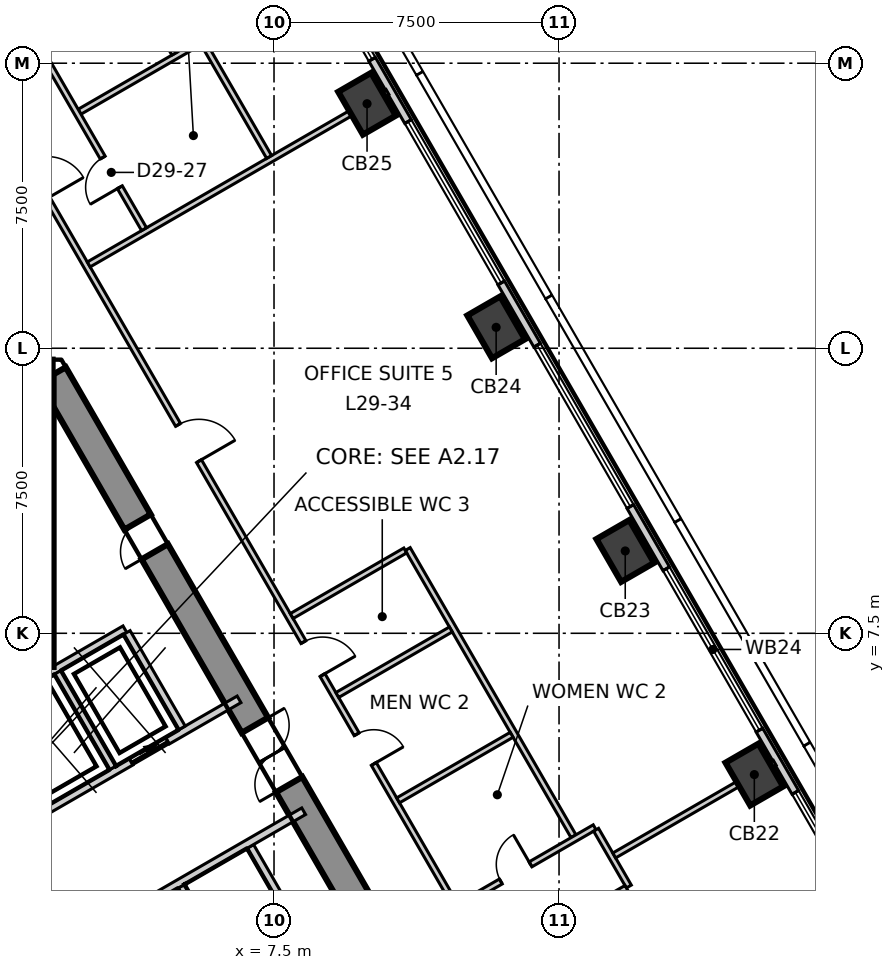
"""IFC4 building model, lengths in metres.
Left out: names, types, materials, properties, quantities, classifications, styles, units other than length and angle.
Written with IfcOpenShell. Run it as: python <this file> out.ifc"""

import sys

from ifc_helpers import new_model, si_unit, direction, frame, frame_2d, origin, origin_2d, place, context, subcontext, project, spatial, polyline, rectangle, outline, extrude, element, fill, save


model = new_model("IFC4")
c1 = context("Model", 3, precision=1e-05, world=origin(), true_north=direction((0.0, 1.0)))
c2 = subcontext(c1, "Body", "Model", "MODEL_VIEW")
j1 = project(units=[si_unit("LENGTHUNIT", "METRE"), si_unit("PLANEANGLEUNIT", "RADIAN")], contexts=[c1])
p1 = place(None, origin())
s1 = spatial("IfcSite", under=j1, at=p1, CompositionType="ELEMENT")
p2 = place(p1, origin())
s2 = spatial("IfcBuilding", under=s1, at=p2, CompositionType="ELEMENT")
p3 = place(p2, frame((0.0, 0.0, 128.3)))
s3 = spatial("IfcBuildingStorey", under=s2, at=p3, CompositionType="ELEMENT", Elevation=128.3)
p4 = place(p3, frame((1.674, 14.3, -0.3), z_axis=(0.0, 0.0, 1.0), x_axis=(-1.0, 0.0, 0.0)))
e1 = element("IfcWall", 1, at=p4, inside=s3, PredefinedType="SHEAR", context=c2, shape_type="SweptSolid", body=[
    extrude(outline(polyline([(-0.231, -0.4), (1.674, -0.4), (3.579, -0.4), (3.117, 0.4), (1.674, 0.4), (0.231, 0.4), (-0.231, -0.4)])), origin(), (0.0, 0.0, 1.0), 4.0),
])
p5 = place(p4, frame((0.974, 0.0, 0.3)))
e2 = element("IfcOpeningElement", 2, at=p5, cuts=e1, PredefinedType="OPENING", context=c2, shape_type="SweptSolid", body=[
    extrude(rectangle(XDim=1.4, YDim=2.1, at=frame_2d((0.7, 1.05))), frame((0.0, 0.41, 0.0), z_axis=(0.0, -1.0, 0.0), x_axis=(1.0, 0.0, 0.0)), (0.0, 0.0, 1.0), 0.82),
])
p6 = place(p3, frame((13.221, -5.7, -0.3), z_axis=(0.0, 0.0, 1.0), x_axis=(-0.499995765644, 0.866027848477, 0.0)))
e3 = element("IfcWall", 3, at=p6, inside=s3, PredefinedType="SHEAR", context=c2, shape_type="SweptSolid", body=[
    extrude(outline(polyline([(-0.231, -0.4), (1.732, -0.4), (3.695, -0.4), (5.658, -0.4), (7.621, -0.4), (9.584, -0.4), (11.547, -0.4), (13.51, -0.4), (15.473, -0.4), (17.436, -0.4), (19.399, -0.4), (21.362, -0.4), (23.325, -0.4), (22.863, 0.4), (20.977, 0.4), (19.091, 0.4), (17.205, 0.4), (15.319, 0.4), (13.433, 0.4), (11.547, 0.4), (9.661, 0.4), (7.775, 0.4), (5.889, 0.4), (4.003, 0.4), (2.117, 0.4), (0.231, 0.4), (-0.231, -0.4)])), origin(), (0.0, 0.0, 1.0), 4.0),
])
p7 = place(p6, frame((10.647, 0.0, 0.3)))
e4 = element("IfcOpeningElement", 4, at=p7, cuts=e3, PredefinedType="OPENING", context=c2, shape_type="SweptSolid", body=[
    extrude(rectangle(XDim=1.8, YDim=2.1, at=frame_2d((0.9, 1.05))), frame((0.0, 0.41, 0.0), z_axis=(0.0, -1.0, 0.0), x_axis=(1.0, 0.0, 0.0)), (0.0, 0.0, 1.0), 0.82),
])
p8 = place(p6, frame((17.721, 0.0, 0.3)))
e5 = element("IfcOpeningElement", 5, at=p8, cuts=e3, PredefinedType="OPENING", context=c2, shape_type="SweptSolid", body=[
    extrude(rectangle(XDim=0.9, YDim=2.1, at=frame_2d((0.45, 1.05))), frame((0.0, 0.41, 0.0), z_axis=(0.0, -1.0, 0.0), x_axis=(1.0, 0.0, 0.0)), (0.0, 0.0, 1.0), 0.82),
])
for number, where, z_axis, x_axis in (
    (6, (20.139, 3.782, -0.3), (0.0, 0.0, 1.0), (-0.5, 0.866, 0.0)),
    (7, (16.742, 9.666, -0.3), (0.0, 0.0, 1.0), (-0.5, 0.866, 0.0)),
    (8, (13.345, 15.55, -0.3), (0.0, 0.0, 1.0), (-0.5, 0.866, 0.0)),
    (9, (9.948, 21.434, -0.3), (0.0, 0.0, 1.0), (-0.5, 0.866, 0.0)),
):
    element("IfcColumn", number, at=place(p3, frame(where, z_axis=z_axis, x_axis=x_axis)), inside=s3, PredefinedType="COLUMN", context=c2, shape_type="SweptSolid", body=[
        extrude(rectangle(XDim=1.3, YDim=1.0, at=origin_2d()), origin(), (0.0, 0.0, 1.0), 4.0),
    ])
p9 = place(p3, frame((31.588, -14.647, 0.0), z_axis=(0.0, 0.0, 1.0), x_axis=(-0.500005036527, 0.866022495925, 0.0)))
e10 = element("IfcWall", 10, at=p9, inside=s3, PredefinedType="ELEMENTEDWALL", context=c2, shape_type="SweptSolid", body=[
    extrude(rectangle(XDim=56.938, YDim=0.2, at=frame_2d((28.469, 0.0))), origin(), (0.0, 0.0, 1.0), 3.7),
])
p10 = place(p9, frame((2.25, 0.0, 0.9)))
e11 = element("IfcOpeningElement", 11, at=p10, cuts=e10, PredefinedType="OPENING", context=c2, shape_type="SweptSolid", body=[
    extrude(rectangle(XDim=4.9, YDim=2.5, at=frame_2d((2.45, 1.25))), frame((0.0, 0.11, 0.0), z_axis=(0.0, -1.0, 0.0), x_axis=(1.0, 0.0, 0.0)), (0.0, 0.0, 1.0), 0.22),
])
p11 = place(p9, frame((9.044, 0.0, 0.9)))
e12 = element("IfcOpeningElement", 12, at=p11, cuts=e10, PredefinedType="OPENING", context=c2, shape_type="SweptSolid", body=[
    extrude(rectangle(XDim=4.9, YDim=2.5, at=frame_2d((2.45, 1.25))), frame((0.0, 0.11, 0.0), z_axis=(0.0, -1.0, 0.0), x_axis=(1.0, 0.0, 0.0)), (0.0, 0.0, 1.0), 0.22),
])
p12 = place(p9, frame((15.838, 0.0, 0.9)))
e13 = element("IfcOpeningElement", 13, at=p12, cuts=e10, PredefinedType="OPENING", context=c2, shape_type="SweptSolid", body=[
    extrude(rectangle(XDim=4.9, YDim=2.5, at=frame_2d((2.45, 1.25))), frame((0.0, 0.11, 0.0), z_axis=(0.0, -1.0, 0.0), x_axis=(1.0, 0.0, 0.0)), (0.0, 0.0, 1.0), 0.22),
])
p13 = place(p9, frame((22.632, 0.0, 0.9)))
e14 = element("IfcOpeningElement", 14, at=p13, cuts=e10, PredefinedType="OPENING", context=c2, shape_type="SweptSolid", body=[
    extrude(rectangle(XDim=4.9, YDim=2.5, at=frame_2d((2.45, 1.25))), frame((0.0, 0.11, 0.0), z_axis=(0.0, -1.0, 0.0), x_axis=(1.0, 0.0, 0.0)), (0.0, 0.0, 1.0), 0.22),
])
p14 = place(p9, frame((29.426, 0.0, 0.9)))
e15 = element("IfcOpeningElement", 15, at=p14, cuts=e10, PredefinedType="OPENING", context=c2, shape_type="SweptSolid", body=[
    extrude(rectangle(XDim=4.9, YDim=2.5, at=frame_2d((2.45, 1.25))), frame((0.0, 0.11, 0.0), z_axis=(0.0, -1.0, 0.0), x_axis=(1.0, 0.0, 0.0)), (0.0, 0.0, 1.0), 0.22),
])
p15 = place(p9, frame((36.22, 0.0, 0.9)))
e16 = element("IfcOpeningElement", 16, at=p15, cuts=e10, PredefinedType="OPENING", context=c2, shape_type="SweptSolid", body=[
    extrude(rectangle(XDim=4.9, YDim=2.5, at=frame_2d((2.45, 1.25))), frame((0.0, 0.11, 0.0), z_axis=(0.0, -1.0, 0.0), x_axis=(1.0, 0.0, 0.0)), (0.0, 0.0, 1.0), 0.22),
])
p16 = place(p9, frame((43.014, 0.0, 0.9)))
e17 = element("IfcOpeningElement", 17, at=p16, cuts=e10, PredefinedType="OPENING", context=c2, shape_type="SweptSolid", body=[
    extrude(rectangle(XDim=4.9, YDim=2.5, at=frame_2d((2.45, 1.25))), frame((0.0, 0.11, 0.0), z_axis=(0.0, -1.0, 0.0), x_axis=(1.0, 0.0, 0.0)), (0.0, 0.0, 1.0), 0.22),
])
p17 = place(p9, frame((49.808, 0.0, 0.9)))
e18 = element("IfcOpeningElement", 18, at=p17, cuts=e10, PredefinedType="OPENING", context=c2, shape_type="SweptSolid", body=[
    extrude(rectangle(XDim=4.9, YDim=2.5, at=frame_2d((2.45, 1.25))), frame((0.0, 0.11, 0.0), z_axis=(0.0, -1.0, 0.0), x_axis=(1.0, 0.0, 0.0)), (0.0, 0.0, 1.0), 0.22),
])
p18 = place(p3, frame((0.076, 21.468, 0.0), z_axis=(0.0, 0.0, 1.0), x_axis=(0.50001203818, -0.866018453426, 0.0)))
e19 = element("IfcWall", 19, at=p18, inside=s3, PredefinedType="PARTITIONING", context=c2, shape_type="SweptSolid", body=[
    extrude(rectangle(XDim=24.448, YDim=0.15, at=frame_2d((12.224, 0.0))), origin(), (0.0, 0.0, 1.0), 3.7),
])
p19 = place(p18, frame((9.798, 0.0, 0.0)))
e20 = element("IfcOpeningElement", 20, at=p19, cuts=e19, PredefinedType="OPENING", context=c2, shape_type="SweptSolid", body=[
    extrude(rectangle(XDim=1.1, YDim=2.1, at=frame_2d((0.55, 1.05))), frame((0.0, 0.085, 0.0), z_axis=(0.0, -1.0, 0.0), x_axis=(1.0, 0.0, 0.0)), (0.0, 0.0, 1.0), 0.17),
])
p20 = place(p18, frame((19.198, 0.0, 0.0)))
e21 = element("IfcOpeningElement", 21, at=p20, cuts=e19, PredefinedType="OPENING", context=c2, shape_type="SweptSolid", body=[
    extrude(rectangle(XDim=0.9, YDim=2.1, at=frame_2d((0.45, 1.05))), frame((0.0, 0.085, 0.0), z_axis=(0.0, -1.0, 0.0), x_axis=(1.0, 0.0, 0.0)), (0.0, 0.0, 1.0), 0.17),
])
p21 = place(p18, frame((16.398, 0.0, 0.0)))
e22 = element("IfcOpeningElement", 22, at=p21, cuts=e19, PredefinedType="OPENING", context=c2, shape_type="SweptSolid", body=[
    extrude(rectangle(XDim=1.0, YDim=2.1, at=frame_2d((0.5, 1.05))), frame((0.0, 0.085, 0.0), z_axis=(0.0, -1.0, 0.0), x_axis=(1.0, 0.0, 0.0)), (0.0, 0.0, 1.0), 0.17),
])
p22 = place(p18, frame((1.815, 0.0, 0.0)))
e23 = element("IfcOpeningElement", 23, at=p22, cuts=e19, PredefinedType="OPENING", context=c2, shape_type="SweptSolid", body=[
    extrude(rectangle(XDim=1.1, YDim=2.1, at=frame_2d((0.55, 1.05))), frame((0.0, 0.085, 0.0), z_axis=(0.0, -1.0, 0.0), x_axis=(1.0, 0.0, 0.0)), (0.0, 0.0, 1.0), 0.17),
])
p23 = place(p3, frame((2.624, 17.205, 0.0), z_axis=(0.0, 0.0, 1.0), x_axis=(0.866014937375, 0.500018127915, 0.0)))
e24 = element("IfcWall", 24, at=p23, inside=s3, PredefinedType="PARTITIONING", context=c2, shape_type="SweptSolid", body=[
    extrude(rectangle(XDim=9.077, YDim=0.15, at=frame_2d((4.539, 0.0))), origin(), (0.0, 0.0, 1.0), 3.7),
])
p24 = place(p3, frame((11.018, 9.717, 0.0), z_axis=(0.0, 0.0, 1.0), x_axis=(0.499888770922, -0.866089612399, 0.0)))
e25 = element("IfcWall", 25, at=p24, inside=s3, PredefinedType="PARTITIONING", context=c2, shape_type="SweptSolid", body=[
    extrude(rectangle(XDim=8.726, YDim=0.15, at=frame_2d((4.363, 0.0))), origin(), (0.0, 0.0, 1.0), 3.7),
])
p25 = place(p3, frame((7.965, 7.954, 0.0), z_axis=(0.0, 0.0, 1.0), x_axis=(0.866044174857, 0.499967486139, 0.0)))
e26 = element("IfcWall", 26, at=p25, inside=s3, PredefinedType="PARTITIONING", context=c2, shape_type="SweptSolid", body=[
    extrude(rectangle(XDim=3.45, YDim=0.15, at=frame_2d((1.725, 0.0))), origin(), (0.0, 0.0, 1.0), 3.7),
])
for number, where, z_axis, x_axis in (
    (27, (9.165, 5.876, 0.0), (0.0, 0.0, 1.0), (0.866, 0.5, 0.0)),
    (28, (10.765, 3.104, 0.0), (0.0, 0.0, 1.0), (0.866, 0.5, 0.0)),
):
    element("IfcWall", number, at=place(p3, frame(where, z_axis=z_axis, x_axis=x_axis)), inside=s3, PredefinedType="PARTITIONING", context=c2, shape_type="SweptSolid", body=[
        extrude(rectangle(XDim=3.45, YDim=0.15, at=frame_2d((1.725, 0.0))), origin(), (0.0, 0.0, 1.0), 3.7),
    ])
p26 = place(p3, frame((12.366, 0.333, 0.0), z_axis=(0.0, 0.0, 1.0), x_axis=(0.865997263264, 0.500048737644, 0.0)))
e29 = element("IfcWall", 29, at=p26, inside=s3, PredefinedType="PARTITIONING", context=c2, shape_type="SweptSolid", body=[
    extrude(rectangle(XDim=4.124, YDim=0.15, at=frame_2d((2.062, 0.0))), origin(), (0.0, 0.0, 1.0), 3.7),
])
p27 = place(p26, frame((1.274, 0.0, 0.0)))
e30 = element("IfcOpeningElement", 30, at=p27, cuts=e29, PredefinedType="OPENING", context=c2, shape_type="SweptSolid", body=[
    extrude(rectangle(XDim=0.9, YDim=2.1, at=frame_2d((0.45, 1.05))), frame((0.0, 0.085, 0.0), z_axis=(0.0, -1.0, 0.0), x_axis=(1.0, 0.0, 0.0)), (0.0, 0.0, 1.0), 0.17),
])
p28 = place(p3, frame((15.975, 2.331, 0.0), z_axis=(0.0, 0.0, 1.0), x_axis=(0.499640762619, -0.866232710263, 0.0)))
e31 = element("IfcWall", 31, at=p28, inside=s3, PredefinedType="PARTITIONING", context=c2, shape_type="SweptSolid", body=[
    extrude(rectangle(XDim=1.725, YDim=0.15, at=frame_2d((0.862, 0.0))), origin(), (0.0, 0.0, 1.0), 3.7),
])
p29 = place(p3, frame((16.452, 1.654, 0.0), z_axis=(0.0, 0.0, 1.0), x_axis=(0.866097235509, 0.49987556316, 0.0)))
e32 = element("IfcWall", 32, at=p29, inside=s3, PredefinedType="PARTITIONING", context=c2, shape_type="SweptSolid", body=[
    extrude(rectangle(XDim=4.877, YDim=0.15, at=frame_2d((2.438, 0.0))), origin(), (0.0, 0.0, 1.0), 3.7),
])
p30 = place(p3, frame((13.266, -1.225, 0.0), z_axis=(0.0, 0.0, 1.0), x_axis=(0.866079163253, 0.499906874306, 0.0)))
e33 = element("IfcWall", 33, at=p30, inside=s3, PredefinedType="PARTITIONING", context=c2, shape_type="SweptSolid", body=[
    extrude(rectangle(XDim=4.049, YDim=0.15, at=frame_2d((2.024, 0.0))), origin(), (0.0, 0.0, 1.0), 3.7),
])
p31 = place(p3, frame((2.383, 21.223, 0.0), z_axis=(0.0, 0.0, 1.0), x_axis=(0.865955274182, 0.500121448367, 0.0)))
e34 = element("IfcWall", 34, at=p31, inside=s3, PredefinedType="PARTITIONING", context=c2, shape_type="SweptSolid", body=[
    extrude(rectangle(XDim=3.725, YDim=0.15, at=frame_2d((1.863, 0.0))), origin(), (0.0, 0.0, 1.0), 3.7),
])
p32 = place(p3, frame((5.646, 23.021, 0.0), z_axis=(0.0, 0.0, 1.0), x_axis=(0.49998991961, -0.866031223622, 0.0)))
e35 = element("IfcWall", 35, at=p32, inside=s3, PredefinedType="PARTITIONING", context=c2, shape_type="SweptSolid", body=[
    extrude(rectangle(XDim=3.45, YDim=0.15, at=frame_2d((1.725, 0.0))), origin(), (0.0, 0.0, 1.0), 3.7),
])
p33 = place(p3, frame((3.816, 24.591, 0.0), z_axis=(0.0, 0.0, 1.0), x_axis=(0.499871667208, -0.86609948408, 0.0)))
e36 = element("IfcWall", 36, at=p33, inside=s3, PredefinedType="PARTITIONING", context=c2, shape_type="SweptSolid", body=[
    extrude(rectangle(XDim=2.125, YDim=0.15, at=frame_2d((1.062, 0.0))), origin(), (0.0, 0.0, 1.0), 3.7),
])
p34 = place(p3, frame((1.255, 23.026, 0.0), z_axis=(0.0, 0.0, 1.0), x_axis=(0.500042884217, -0.866000643155, 0.0)))
e37 = element("IfcWall", 37, at=p34, inside=s3, PredefinedType="PARTITIONING", context=c2, shape_type="SweptSolid", body=[
    extrude(rectangle(XDim=5.65, YDim=0.15, at=frame_2d((2.825, 0.0))), origin(), (0.0, 0.0, 1.0), 3.7),
])
p35 = place(p34, frame((3.475, 0.0, 0.0)))
e38 = element("IfcOpeningElement", 38, at=p35, cuts=e37, PredefinedType="OPENING", context=c2, shape_type="SweptSolid", body=[
    extrude(rectangle(XDim=0.9, YDim=2.1, at=frame_2d((0.45, 1.05))), frame((0.0, 0.085, 0.0), z_axis=(0.0, -1.0, 0.0), x_axis=(1.0, 0.0, 0.0)), (0.0, 0.0, 1.0), 0.17),
])
p36 = place(p3, frame((-0.002, 5.542, 0.0), z_axis=(0.0, 0.0, 1.0), x_axis=(0.866103910842, 0.499863997127, 0.0)))
e39 = element("IfcWall", 39, at=p36, inside=s3, PredefinedType="SOLIDWALL", context=c2, shape_type="SweptSolid", body=[
    extrude(rectangle(XDim=4.131, YDim=0.2, at=frame_2d((2.065, 0.0))), origin(), (0.0, 0.0, 1.0), 3.7),
])
p37 = place(p3, frame((1.577, 2.874, 0.0), z_axis=(0.0, 0.0, 1.0), x_axis=(0.866073694534, 0.499916348638, 0.0)))
e40 = element("IfcWall", 40, at=p37, inside=s3, PredefinedType="SOLIDWALL", context=c2, shape_type="SweptSolid", body=[
    extrude(rectangle(XDim=5.777, YDim=0.2, at=frame_2d((2.888, 0.0))), origin(), (0.0, 0.0, 1.0), 3.7),
])
p38 = place(p37, frame((2.497, 0.0, 0.0)))
e41 = element("IfcOpeningElement", 41, at=p38, cuts=e40, PredefinedType="OPENING", context=c2, shape_type="SweptSolid", body=[
    extrude(rectangle(XDim=1.1, YDim=2.1, at=frame_2d((0.55, 1.05))), frame((0.0, 0.11, 0.0), z_axis=(0.0, -1.0, 0.0), x_axis=(1.0, 0.0, 0.0)), (0.0, 0.0, 1.0), 0.22),
])
p39 = place(p3, frame((3.626, 7.52, 0.0), z_axis=(0.0, 0.0, 1.0), x_axis=(0.500060147554, -0.865990674793, 0.0)))
e42 = element("IfcWall", 42, at=p39, inside=s3, PredefinedType="SOLIDWALL", context=c2, shape_type="SweptSolid", body=[
    extrude(rectangle(XDim=2.9, YDim=0.2, at=frame_2d((1.45, 0.0))), origin(), (0.0, 0.0, 1.0), 3.7),
])
p40 = place(p3, frame((6.876, 1.891, 0.0), z_axis=(0.0, 0.0, 1.0), x_axis=(0.499990139034, -0.866031096941, 0.0)))
e43 = element("IfcWall", 43, at=p40, inside=s3, PredefinedType="SOLIDWALL", context=c2, shape_type="SweptSolid", body=[
    extrude(rectangle(XDim=3.0, YDim=0.2, at=frame_2d((1.5, 0.0))), origin(), (0.0, 0.0, 1.0), 3.7),
])
for number, where, z_axis, x_axis in (
    (44, (1.807, 6.47, 0.0), (0.0, 0.0, 1.0), (0.5, -0.866, 0.0)),
    (45, (5.057, 0.841, 0.0), (0.0, 0.0, 1.0), (0.5, -0.866, 0.0)),
):
    element("IfcWall", number, at=place(p3, frame(where, z_axis=z_axis, x_axis=x_axis)), inside=s3, PredefinedType="SOLIDWALL", context=c2, shape_type="SweptSolid", body=[
        extrude(rectangle(XDim=2.9, YDim=0.2, at=frame_2d((1.45, 0.0))), origin(), (0.0, 0.0, 1.0), 3.7),
    ])
p41 = place(p3, frame((3.278, -0.071, 0.0), z_axis=(0.0, 0.0, 1.0), x_axis=(0.865929348003, 0.5001663366, 0.0)))
e46 = element("IfcWall", 46, at=p41, inside=s3, PredefinedType="SOLIDWALL", context=c2, shape_type="SweptSolid", body=[
    extrude(rectangle(XDim=5.776, YDim=0.2, at=frame_2d((2.888, 0.0))), origin(), (0.0, 0.0, 1.0), 3.7),
])
p42 = place(p3, frame((1.6, 6.615, 0.0), z_axis=(0.0, 0.0, 1.0), x_axis=(0.0, 1.0, 0.0)))
e47 = element("IfcWall", 47, at=p42, inside=s3, PredefinedType="SOLIDWALL", context=c2, shape_type="SweptSolid", body=[
    extrude(rectangle(XDim=7.665, YDim=0.2, at=frame_2d((3.833, 0.0))), origin(), (0.0, 0.0, 1.0), 3.7),
])
p43 = place(p12, origin())
e48 = element("IfcWindow", 48, at=p43, inside=s3, PartitioningType="SINGLE_PANEL", PredefinedType="WINDOW", context=c2, shape_type="SweptSolid", body=[
    extrude(rectangle(XDim=4.9, YDim=2.5, at=frame_2d((2.45, 1.25))), frame((0.0, 0.03, 0.0), z_axis=(0.0, -1.0, 0.0), x_axis=(1.0, 0.0, 0.0)), (0.0, 0.0, 1.0), 0.06),
])
fill(e13, e48)
p44 = place(p13, origin())
e49 = element("IfcWindow", 49, at=p44, inside=s3, PartitioningType="SINGLE_PANEL", PredefinedType="WINDOW", context=c2, shape_type="SweptSolid", body=[
    extrude(rectangle(XDim=4.9, YDim=2.5, at=frame_2d((2.45, 1.25))), frame((0.0, 0.03, 0.0), z_axis=(0.0, -1.0, 0.0), x_axis=(1.0, 0.0, 0.0)), (0.0, 0.0, 1.0), 0.06),
])
fill(e14, e49)
p45 = place(p14, origin())
e50 = element("IfcWindow", 50, at=p45, inside=s3, PartitioningType="SINGLE_PANEL", PredefinedType="WINDOW", context=c2, shape_type="SweptSolid", body=[
    extrude(rectangle(XDim=4.9, YDim=2.5, at=frame_2d((2.45, 1.25))), frame((0.0, 0.03, 0.0), z_axis=(0.0, -1.0, 0.0), x_axis=(1.0, 0.0, 0.0)), (0.0, 0.0, 1.0), 0.06),
])
fill(e15, e50)
p46 = place(p15, origin())
e51 = element("IfcWindow", 51, at=p46, inside=s3, PartitioningType="SINGLE_PANEL", PredefinedType="WINDOW", context=c2, shape_type="SweptSolid", body=[
    extrude(rectangle(XDim=4.9, YDim=2.5, at=frame_2d((2.45, 1.25))), frame((0.0, 0.03, 0.0), z_axis=(0.0, -1.0, 0.0), x_axis=(1.0, 0.0, 0.0)), (0.0, 0.0, 1.0), 0.06),
])
fill(e16, e51)
p47 = place(p16, origin())
e52 = element("IfcWindow", 52, at=p47, inside=s3, PartitioningType="SINGLE_PANEL", PredefinedType="WINDOW", context=c2, shape_type="SweptSolid", body=[
    extrude(rectangle(XDim=4.9, YDim=2.5, at=frame_2d((2.45, 1.25))), frame((0.0, 0.03, 0.0), z_axis=(0.0, -1.0, 0.0), x_axis=(1.0, 0.0, 0.0)), (0.0, 0.0, 1.0), 0.06),
])
fill(e17, e52)
p48 = place(p38, origin())
e53 = element("IfcDoor", 53, at=p48, inside=s3, OperationType="SLIDING_TO_LEFT", PredefinedType="DOOR", context=c2, shape_type="SweptSolid", body=[
    extrude(rectangle(XDim=1.1, YDim=2.1, at=frame_2d((0.55, 1.05))), frame((0.0, 0.025, 0.0), z_axis=(0.0, -1.0, 0.0), x_axis=(1.0, 0.0, 0.0)), (0.0, 0.0, 1.0), 0.05),
])
fill(e41, e53)
p49 = place(p19, origin())
e54 = element("IfcDoor", 54, at=p49, inside=s3, OperationType="SINGLE_SWING_LEFT", PredefinedType="DOOR", context=c2, shape_type="SweptSolid", body=[
    extrude(rectangle(XDim=1.1, YDim=2.1, at=frame_2d((0.55, 1.05))), frame((0.0, 0.025, 0.0), z_axis=(0.0, -1.0, 0.0), x_axis=(1.0, 0.0, 0.0)), (0.0, 0.0, 1.0), 0.05),
])
fill(e20, e54)
p50 = place(p27, origin())
e55 = element("IfcDoor", 55, at=p50, inside=s3, OperationType="SINGLE_SWING_LEFT", PredefinedType="DOOR", context=c2, shape_type="SweptSolid", body=[
    extrude(rectangle(XDim=0.9, YDim=2.1, at=frame_2d((0.45, 1.05))), frame((0.0, 0.025, 0.0), z_axis=(0.0, -1.0, 0.0), x_axis=(1.0, 0.0, 0.0)), (0.0, 0.0, 1.0), 0.05),
])
fill(e30, e55)
p51 = place(p20, origin())
e56 = element("IfcDoor", 56, at=p51, inside=s3, OperationType="SINGLE_SWING_LEFT", PredefinedType="DOOR", context=c2, shape_type="SweptSolid", body=[
    extrude(rectangle(XDim=0.9, YDim=2.1, at=frame_2d((0.45, 1.05))), frame((0.0, 0.025, 0.0), z_axis=(0.0, -1.0, 0.0), x_axis=(1.0, 0.0, 0.0)), (0.0, 0.0, 1.0), 0.05),
])
fill(e21, e56)
p52 = place(p21, origin())
e57 = element("IfcDoor", 57, at=p52, inside=s3, OperationType="SINGLE_SWING_LEFT", PredefinedType="DOOR", context=c2, shape_type="SweptSolid", body=[
    extrude(rectangle(XDim=1.0, YDim=2.1, at=frame_2d((0.5, 1.05))), frame((0.0, 0.025, 0.0), z_axis=(0.0, -1.0, 0.0), x_axis=(1.0, 0.0, 0.0)), (0.0, 0.0, 1.0), 0.05),
])
fill(e22, e57)
p53 = place(p35, origin())
e58 = element("IfcDoor", 58, at=p53, inside=s3, OperationType="SINGLE_SWING_RIGHT", PredefinedType="DOOR", context=c2, shape_type="SweptSolid", body=[
    extrude(rectangle(XDim=0.9, YDim=2.1, at=frame_2d((0.45, 1.05))), frame((0.0, 0.025, 0.0), z_axis=(0.0, -1.0, 0.0), x_axis=(1.0, 0.0, 0.0)), (0.0, 0.0, 1.0), 0.05),
])
fill(e38, e58)
p54 = place(p7, origin())
e59 = element("IfcDoor", 59, at=p54, inside=s3, OperationType="DOUBLE_DOOR_SINGLE_SWING", PredefinedType="DOOR", context=c2, shape_type="SweptSolid", body=[
    extrude(rectangle(XDim=1.8, YDim=2.1, at=frame_2d((0.9, 1.05))), frame((0.0, 0.025, 0.0), z_axis=(0.0, -1.0, 0.0), x_axis=(1.0, 0.0, 0.0)), (0.0, 0.0, 1.0), 0.05),
])
fill(e4, e59)
p55 = place(p8, origin())
e60 = element("IfcDoor", 60, at=p55, inside=s3, OperationType="SINGLE_SWING_RIGHT", PredefinedType="DOOR", context=c2, shape_type="SweptSolid", body=[
    extrude(rectangle(XDim=0.9, YDim=2.1, at=frame_2d((0.45, 1.05))), frame((0.0, 0.025, 0.0), z_axis=(0.0, -1.0, 0.0), x_axis=(1.0, 0.0, 0.0)), (0.0, 0.0, 1.0), 0.05),
])
fill(e5, e60)
save(model, sys.argv[1])
